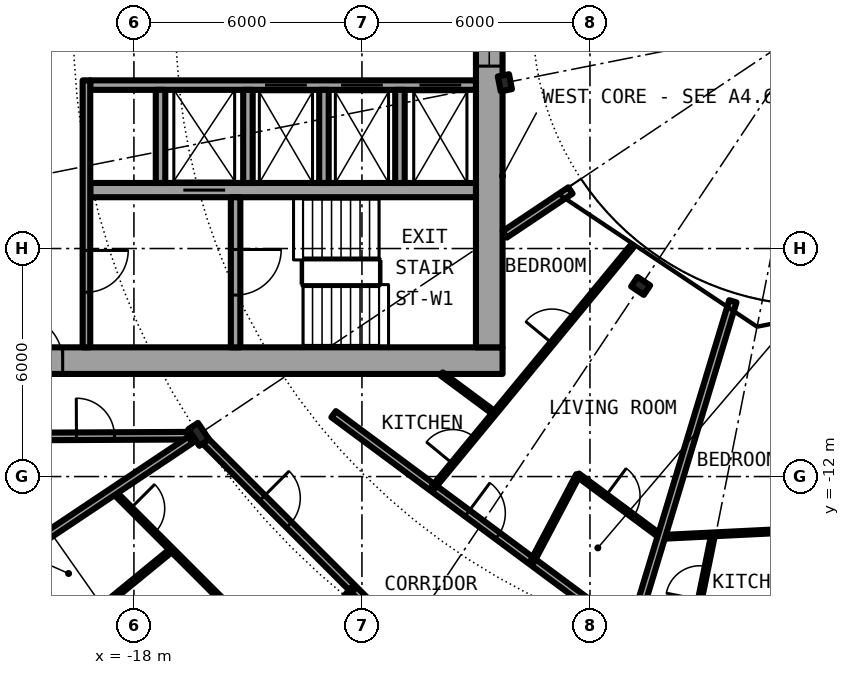
"""IFC4 building model, lengths in metres.
Left out: names, types, materials, properties, quantities, classifications, styles, units other than length and angle.
Written with IfcOpenShell. Run it as: python <this file> out.ifc"""

import sys

from ifc_helpers import new_model, si_unit, direction, frame, frame_2d, origin, origin_2d, place, context, subcontext, project, spatial, rectangle, i_section, extrude, element, fill, save


model = new_model("IFC4")
c1 = context("Model", 3, precision=1e-05, world=origin(), true_north=direction((0.0, 1.0)))
c2 = subcontext(c1, "Body", "Model", "MODEL_VIEW")
j1 = project(units=[si_unit("LENGTHUNIT", "METRE"), si_unit("PLANEANGLEUNIT", "RADIAN")], contexts=[c1])
p1 = place(None, origin())
s1 = spatial("IfcSite", under=j1, at=p1, CompositionType="ELEMENT")
p2 = place(p1, origin())
s2 = spatial("IfcBuilding", under=s1, at=p2, CompositionType="ELEMENT")
p3 = place(p2, frame((0.0, 0.0, 63.6)))
s3 = spatial("IfcBuildingStorey", under=s2, at=p3, CompositionType="ELEMENT", Elevation=63.6)
p4 = place(p3, frame((-16.297, -10.889, 0.0), z_axis=(0.0, 0.0, 1.0), x_axis=(-0.831469612303, -0.55557023302, 0.0)))
e1 = element("IfcColumn", 1, at=p4, inside=s3, PredefinedType="COLUMN", context=c2, shape_type="SweptSolid", body=[
    extrude(i_section(OverallWidth=0.306, OverallDepth=0.524, WebThickness=0.021, FlangeThickness=0.04, FilletRadius=0.027, at=origin_2d()), origin(), (0.0, 0.0, 1.0), 3.05),
])
for number, where, z_axis, x_axis in (
    (2, (-8.239, -1.639, 0.0), (0.0, 0.0, 1.0), (-0.981, -0.195, 0.0)),
    (3, (-4.667, -6.984, 0.0), (0.0, 0.0, 1.0), (-0.556, -0.831, 0.0)),
):
    element("IfcColumn", number, at=place(p3, frame(where, z_axis=z_axis, x_axis=x_axis)), inside=s3, PredefinedType="COLUMN", context=c2, shape_type="SweptSolid", body=[
        extrude(i_section(OverallWidth=0.3, OverallDepth=0.4, WebThickness=0.013, FlangeThickness=0.024, FilletRadius=0.027, at=origin_2d()), origin(), (0.0, 0.0, 1.0), 3.05),
    ])
p5 = place(p3, frame((-22.699, -15.167, 0.0), z_axis=(0.0, 0.0, 1.0), x_axis=(0.634382322723, -0.773019449054, 0.0)))
e4 = element("IfcWall", 4, at=p5, inside=s3, PredefinedType="SOLIDWALL", context=c2, shape_type="SweptSolid", body=[
    extrude(rectangle(XDim=5.352, YDim=0.25, at=frame_2d((2.676, 0.0))), origin(), (0.0, 0.0, 1.0), 2.7),
])
p6 = place(p5, frame((0.841, 0.0, 0.0)))
e5 = element("IfcOpeningElement", 5, at=p6, cuts=e4, PredefinedType="OPENING", context=c2, shape_type="SweptSolid", body=[
    extrude(rectangle(XDim=1.0, YDim=2.2, at=frame_2d((0.5, 1.1))), frame((0.0, 0.135, 0.0), z_axis=(0.0, -1.0, 0.0), x_axis=(1.0, 0.0, 0.0)), (0.0, 0.0, 1.0), 0.27),
])
p7 = place(p5, frame((3.111, 0.0, 0.3)))
e6 = element("IfcOpeningElement", 6, at=p7, cuts=e4, PredefinedType="OPENING", context=c2, shape_type="SweptSolid", body=[
    extrude(rectangle(XDim=1.8, YDim=2.1, at=frame_2d((0.9, 1.05))), frame((0.0, 0.135, 0.0), z_axis=(0.0, -1.0, 0.0), x_axis=(1.0, 0.0, 0.0)), (0.0, 0.0, 1.0), 0.27),
])
p8 = place(p3, frame((-22.3, -8.95, 0.0), z_axis=(0.0, 0.0, 1.0), x_axis=(1.0, 0.0, 0.0)))
e7 = element("IfcWall", 7, at=p8, inside=s3, PredefinedType="SHEAR", context=c2, shape_type="SweptSolid", body=[
    extrude(rectangle(XDim=14.0, YDim=0.7, at=frame_2d((7.0, 0.0))), origin(), (0.0, 0.0, 1.0), 3.05),
])
p9 = place(p8, frame((1.225, 0.0, 0.0)))
e8 = element("IfcOpeningElement", 8, at=p9, cuts=e7, PredefinedType="OPENING", context=c2, shape_type="SweptSolid", body=[
    extrude(rectangle(XDim=1.2, YDim=2.3, at=frame_2d((0.6, 1.15))), frame((0.0, 0.36, 0.0), z_axis=(0.0, -1.0, 0.0), x_axis=(1.0, 0.0, 0.0)), (0.0, 0.0, 1.0), 0.72),
])
p10 = place(p3, frame((-8.65, 8.6, 0.0), z_axis=(0.0, 0.0, 1.0), x_axis=(0.0, -1.0, 0.0)))
e9 = element("IfcWall", 9, at=p10, inside=s3, PredefinedType="SHEAR", context=c2, shape_type="SweptSolid", body=[
    extrude(rectangle(XDim=17.2, YDim=0.7, at=frame_2d((8.6, 0.0))), origin(), (0.0, 0.0, 1.0), 3.05),
])
p11 = place(p10, frame((7.4, 0.0, 0.1)))
e10 = element("IfcOpeningElement", 10, at=p11, cuts=e9, PredefinedType="OPENING", context=c2, shape_type="SweptSolid", body=[
    extrude(rectangle(XDim=2.4, YDim=2.2, at=frame_2d((1.2, 1.1))), frame((0.0, 0.36, 0.0), z_axis=(0.0, -1.0, 0.0), x_axis=(1.0, 0.0, 0.0)), (0.0, 0.0, 1.0), 0.72),
])
p12 = place(p3, frame((-9.0, -1.7, 0.0), z_axis=(0.0, 0.0, 1.0), x_axis=(-1.0, 0.0, 0.0)))
e11 = element("IfcWall", 11, at=p12, inside=s3, PredefinedType="SHEAR", context=c2, shape_type="SweptSolid", body=[
    extrude(rectangle(XDim=10.15, YDim=0.25, at=frame_2d((5.075, 0.0))), origin(), (0.0, 0.0, 1.0), 3.05),
])
p13 = place(p12, frame((0.387, 0.0, 0.0)))
e12 = element("IfcOpeningElement", 12, at=p13, cuts=e11, PredefinedType="OPENING", context=c2, shape_type="SweptSolid", body=[
    extrude(rectangle(XDim=1.1, YDim=2.3, at=frame_2d((0.55, 1.15))), frame((0.0, 0.135, 0.0), z_axis=(0.0, -1.0, 0.0), x_axis=(1.0, 0.0, 0.0)), (0.0, 0.0, 1.0), 0.27),
])
p14 = place(p12, frame((2.45, 0.0, 0.0)))
e13 = element("IfcOpeningElement", 13, at=p14, cuts=e11, PredefinedType="OPENING", context=c2, shape_type="SweptSolid", body=[
    extrude(rectangle(XDim=1.1, YDim=2.3, at=frame_2d((0.55, 1.15))), frame((0.0, 0.135, 0.0), z_axis=(0.0, -1.0, 0.0), x_axis=(1.0, 0.0, 0.0)), (0.0, 0.0, 1.0), 0.27),
])
p15 = place(p12, frame((4.45, 0.0, 0.0)))
e14 = element("IfcOpeningElement", 14, at=p15, cuts=e11, PredefinedType="OPENING", context=c2, shape_type="SweptSolid", body=[
    extrude(rectangle(XDim=1.1, YDim=2.3, at=frame_2d((0.55, 1.15))), frame((0.0, 0.135, 0.0), z_axis=(0.0, -1.0, 0.0), x_axis=(1.0, 0.0, 0.0)), (0.0, 0.0, 1.0), 0.27),
])
p16 = place(p3, frame((-9.0, -4.462, 0.0), z_axis=(0.0, 0.0, 1.0), x_axis=(-1.0, 0.0, 0.0)))
e15 = element("IfcWall", 15, at=p16, inside=s3, PredefinedType="SHEAR", context=c2, shape_type="SweptSolid", body=[
    extrude(rectangle(XDim=10.15, YDim=0.375, at=frame_2d((5.075, 0.0))), origin(), (0.0, 0.0, 1.0), 3.05),
])
p17 = place(p16, frame((6.6, 0.0, 0.0)))
e16 = element("IfcOpeningElement", 16, at=p17, cuts=e15, PredefinedType="OPENING", context=c2, shape_type="SweptSolid", body=[
    extrude(rectangle(XDim=1.1, YDim=2.3, at=frame_2d((0.55, 1.15))), frame((0.0, 0.198, 0.0), z_axis=(0.0, -1.0, 0.0), x_axis=(1.0, 0.0, 0.0)), (0.0, 0.0, 1.0), 0.395),
])
p18 = place(p3, frame((-15.325, -4.65, 0.0), z_axis=(0.0, 0.0, 1.0), x_axis=(0.0, -1.0, 0.0)))
e17 = element("IfcWall", 17, at=p18, inside=s3, PredefinedType="SHEAR", context=c2, shape_type="SweptSolid", body=[
    extrude(rectangle(XDim=3.95, YDim=0.25, at=frame_2d((1.975, 0.0))), origin(), (0.0, 0.0, 1.0), 3.05),
])
p19 = place(p18, frame((1.375, 0.0, 0.0)))
e18 = element("IfcOpeningElement", 18, at=p19, cuts=e17, PredefinedType="OPENING", context=c2, shape_type="SweptSolid", body=[
    extrude(rectangle(XDim=1.2, YDim=2.3, at=frame_2d((0.6, 1.15))), frame((0.0, 0.135, 0.0), z_axis=(0.0, -1.0, 0.0), x_axis=(1.0, 0.0, 0.0)), (0.0, 0.0, 1.0), 0.27),
])
for number, where, z_axis, x_axis in (
    (19, (-15.0, -1.825, 0.0), (0.0, 0.0, 1.0), (0.0, -1.0, 0.0)),
    (20, (-17.3, -1.825, 0.0), (0.0, 0.0, 1.0), (0.0, -1.0, 0.0)),
):
    element("IfcWall", number, at=place(p3, frame(where, z_axis=z_axis, x_axis=x_axis)), inside=s3, PredefinedType="SOLIDWALL", context=c2, shape_type="SweptSolid", body=[
        extrude(rectangle(XDim=2.45, YDim=0.25, at=frame_2d((1.225, 0.0))), origin(), (0.0, 0.0, 1.0), 2.7),
    ])
p20 = place(p3, frame((-19.25, -1.575, 0.0), z_axis=(0.0, 0.0, 1.0), x_axis=(0.0, -1.0, 0.0)))
e21 = element("IfcWall", 21, at=p20, inside=s3, PredefinedType="SOLIDWALL", context=c2, shape_type="SweptSolid", body=[
    extrude(rectangle(XDim=7.025, YDim=0.2, at=frame_2d((3.513, 0.0))), origin(), (0.0, 0.0, 1.0), 2.7),
])
p21 = place(p20, frame((4.475, 0.0, 0.0)))
e22 = element("IfcOpeningElement", 22, at=p21, cuts=e21, PredefinedType="OPENING", context=c2, shape_type="SweptSolid", body=[
    extrude(rectangle(XDim=1.1, YDim=2.3, at=frame_2d((0.55, 1.15))), frame((0.0, 0.11, 0.0), z_axis=(0.0, -1.0, 0.0), x_axis=(1.0, 0.0, 0.0)), (0.0, 0.0, 1.0), 0.22),
])
for number, where, z_axis, x_axis in (
    (23, (-11.0, -1.825, 0.0), (0.0, 0.0, 1.0), (0.0, -1.0, 0.0)),
    (24, (-13.0, -1.825, 0.0), (0.0, 0.0, 1.0), (0.0, -1.0, 0.0)),
):
    element("IfcWall", number, at=place(p3, frame(where, z_axis=z_axis, x_axis=x_axis)), inside=s3, PredefinedType="SOLIDWALL", context=c2, shape_type="SweptSolid", body=[
        extrude(rectangle(XDim=2.45, YDim=0.25, at=frame_2d((1.225, 0.0))), origin(), (0.0, 0.0, 1.0), 2.7),
    ])
p22 = place(p3, frame((-18.545, -12.386, 0.0), z_axis=(0.0, 0.0, 1.0), x_axis=(0.707106781187, -0.707106781187, 0.0)))
e25 = element("IfcWall", 25, at=p22, inside=s3, PredefinedType="PARTITIONING", context=c2, shape_type="SweptSolid", body=[
    extrude(rectangle(XDim=4.351, YDim=0.1, at=frame_2d((2.176, 0.0))), origin(), (0.0, 0.0, 1.0), 2.7),
])
p23 = place(p22, frame((0.644, 0.0, 0.0)))
e26 = element("IfcOpeningElement", 26, at=p23, cuts=e25, PredefinedType="OPENING", context=c2, shape_type="SweptSolid", body=[
    extrude(rectangle(XDim=0.9, YDim=2.3, at=frame_2d((0.45, 1.15))), frame((0.0, 0.06, 0.0), z_axis=(0.0, -1.0, 0.0), x_axis=(1.0, 0.0, 0.0)), (0.0, 0.0, 1.0), 0.12),
])
p24 = place(p3, frame((-16.186, -11.0, 0.0), z_axis=(0.0, 0.0, 1.0), x_axis=(0.707106781187, -0.707106781187, 0.0)))
e27 = element("IfcWall", 27, at=p24, inside=s3, PredefinedType="PARTITIONING", context=c2, shape_type="SweptSolid", body=[
    extrude(rectangle(XDim=7.334, YDim=0.2, at=frame_2d((3.667, 0.0))), origin(), (0.0, 0.0, 1.0), 2.38),
])
p25 = place(p24, frame((2.211, 0.0, 0.0)))
e28 = element("IfcOpeningElement", 28, at=p25, cuts=e27, PredefinedType="OPENING", context=c2, shape_type="SweptSolid", body=[
    extrude(rectangle(XDim=1.0, YDim=2.3, at=frame_2d((0.5, 1.15))), frame((0.0, 0.11, 0.0), z_axis=(0.0, -1.0, 0.0), x_axis=(1.0, 0.0, 0.0)), (0.0, 0.0, 1.0), 0.22),
])
p26 = place(p3, frame((-12.745, -10.358, 0.0), z_axis=(0.0, 0.0, 1.0), x_axis=(0.803191461888, -0.595720971219, 0.0)))
e29 = element("IfcWall", 29, at=p26, inside=s3, PredefinedType="PARTITIONING", context=c2, shape_type="SweptSolid", body=[
    extrude(rectangle(XDim=9.76, YDim=0.2, at=frame_2d((4.88, 0.0))), origin(), (0.0, 0.0, 1.0), 2.7),
])
p27 = place(p26, frame((4.38, 0.0, 0.0)))
e30 = element("IfcOpeningElement", 30, at=p27, cuts=e29, PredefinedType="OPENING", context=c2, shape_type="SweptSolid", body=[
    extrude(rectangle(XDim=1.0, YDim=2.3, at=frame_2d((0.5, 1.15))), frame((0.0, 0.11, 0.0), z_axis=(0.0, -1.0, 0.0), x_axis=(1.0, 0.0, 0.0)), (0.0, 0.0, 1.0), 0.22),
])
p28 = place(p3, frame((-9.904, -9.3, 0.0), z_axis=(0.0, 0.0, 1.0), x_axis=(0.803135014325, -0.595797070121, 0.0)))
e31 = element("IfcWall", 31, at=p28, inside=s3, PredefinedType="PARTITIONING", context=c2, shape_type="SweptSolid", body=[
    extrude(rectangle(XDim=1.732, YDim=0.1, at=frame_2d((0.866, 0.0))), origin(), (0.0, 0.0, 1.0), 2.7),
])
p29 = place(p3, frame((-6.319, -11.96, 0.0), z_axis=(0.0, 0.0, 1.0), x_axis=(0.803128348509, -0.595806055542, 0.0)))
e32 = element("IfcWall", 32, at=p29, inside=s3, PredefinedType="PARTITIONING", context=c2, shape_type="SweptSolid", body=[
    extrude(rectangle(XDim=2.734, YDim=0.1, at=frame_2d((1.367, 0.0))), origin(), (0.0, 0.0, 1.0), 2.7),
])
p30 = place(p29, frame((0.918, 0.0, 0.0)))
e33 = element("IfcOpeningElement", 33, at=p30, cuts=e32, PredefinedType="OPENING", context=c2, shape_type="SweptSolid", body=[
    extrude(rectangle(XDim=0.9, YDim=2.3, at=frame_2d((0.45, 1.15))), frame((0.0, 0.06, 0.0), z_axis=(0.0, -1.0, 0.0), x_axis=(1.0, 0.0, 0.0)), (0.0, 0.0, 1.0), 0.12),
])
p31 = place(p3, frame((-4.132, -13.589, 0.0), z_axis=(0.0, 0.0, 1.0), x_axis=(0.998789681748, 0.049185075323, 0.0)))
e34 = element("IfcWall", 34, at=p31, inside=s3, PredefinedType="PARTITIONING", context=c2, shape_type="SweptSolid", body=[
    extrude(rectangle(XDim=4.11, YDim=0.1, at=frame_2d((2.055, 0.0))), origin(), (0.0, 0.0, 1.0), 2.7),
])
p32 = place(p3, frame((-21.675, -10.95, 0.0), z_axis=(0.0, 0.0, 1.0), x_axis=(0.999988019025, 0.004895079807, 0.0)))
e35 = element("IfcWall", 35, at=p32, inside=s3, PredefinedType="PARTITIONING", context=c2, shape_type="SweptSolid", body=[
    extrude(rectangle(XDim=5.087, YDim=0.2, at=frame_2d((2.543, 0.0))), origin(), (0.0, 0.0, 1.0), 2.7),
])
p33 = place(p32, frame((2.163, 0.0, 0.0)))
e36 = element("IfcOpeningElement", 36, at=p33, cuts=e35, PredefinedType="OPENING", context=c2, shape_type="SweptSolid", body=[
    extrude(rectangle(XDim=1.0, YDim=2.3, at=frame_2d((0.5, 1.15))), frame((0.0, 0.11, 0.0), z_axis=(0.0, -1.0, 0.0), x_axis=(1.0, 0.0, 0.0)), (0.0, 0.0, 1.0), 0.22),
])
p34 = place(p3, frame((-6.513, -4.472, 0.0), z_axis=(0.0, 0.0, 1.0), x_axis=(-0.831382204863, -0.555701025225, 0.0)))
e37 = element("IfcWall", 37, at=p34, inside=s3, PredefinedType="PARTITIONING", context=c2, shape_type="SweptSolid", body=[
    extrude(rectangle(XDim=2.082, YDim=0.2, at=frame_2d((1.041, 0.0))), origin(), (0.0, 0.0, 1.0), 2.7),
])
p35 = place(p3, frame((-22.595, -15.097, 0.0), z_axis=(0.0, 0.0, 1.0), x_axis=(0.831505405283, 0.555516661303, 0.0)))
e38 = element("IfcWall", 38, at=p35, inside=s3, PredefinedType="PARTITIONING", context=c2, shape_type="SweptSolid", body=[
    extrude(rectangle(XDim=7.312, YDim=0.2, at=frame_2d((3.656, 0.0))), origin(), (0.0, 0.0, 1.0), 2.7),
])
p36 = place(p3, frame((-21.023, -17.22, 0.0), z_axis=(0.0, 0.0, 1.0), x_axis=(0.773517471898, 0.633774976367, 0.0)))
e39 = element("IfcWall", 39, at=p36, inside=s3, PredefinedType="PARTITIONING", context=c2, shape_type="SweptSolid", body=[
    extrude(rectangle(XDim=5.196, YDim=0.1, at=frame_2d((2.598, 0.0))), origin(), (0.0, 0.0, 1.0), 2.7),
])
p37 = place(p3, frame((-13.927, -17.004, 0.0), z_axis=(0.0, 0.0, 1.0), x_axis=(0.633582447834, 0.77367517848, 0.0)))
e40 = element("IfcWall", 40, at=p37, inside=s3, PredefinedType="PARTITIONING", context=c2, shape_type="SweptSolid", body=[
    extrude(rectangle(XDim=2.661, YDim=0.1, at=frame_2d((1.331, 0.0))), origin(), (0.0, 0.0, 1.0), 2.7),
])
p38 = place(p37, frame((0.881, 0.0, 0.0)))
e41 = element("IfcOpeningElement", 41, at=p38, cuts=e40, PredefinedType="OPENING", context=c2, shape_type="SweptSolid", body=[
    extrude(rectangle(XDim=0.9, YDim=2.3, at=frame_2d((0.45, 1.15))), frame((0.0, 0.06, 0.0), z_axis=(0.0, -1.0, 0.0), x_axis=(1.0, 0.0, 0.0)), (0.0, 0.0, 1.0), 0.12),
])
p39 = place(p3, frame((-10.132, -12.296, 0.0), z_axis=(0.0, 0.0, 1.0), x_axis=(0.636105207978, 0.771602335652, 0.0)))
e42 = element("IfcWall", 42, at=p39, inside=s3, PredefinedType="PARTITIONING", context=c2, shape_type="SweptSolid", body=[
    extrude(rectangle(XDim=8.213, YDim=0.1, at=frame_2d((4.106, 0.0))), origin(), (0.0, 0.0, 1.0), 2.7),
])
p40 = place(p39, frame((0.821, 0.0, 0.0)))
e43 = element("IfcOpeningElement", 43, at=p40, cuts=e42, PredefinedType="OPENING", context=c2, shape_type="SweptSolid", body=[
    extrude(rectangle(XDim=0.9, YDim=2.3, at=frame_2d((0.45, 1.15))), frame((0.0, 0.06, 0.0), z_axis=(0.0, -1.0, 0.0), x_axis=(1.0, 0.0, 0.0)), (0.0, 0.0, 1.0), 0.12),
])
p41 = place(p39, frame((4.929, 0.0, 0.0)))
e44 = element("IfcOpeningElement", 44, at=p41, cuts=e42, PredefinedType="OPENING", context=c2, shape_type="SweptSolid", body=[
    extrude(rectangle(XDim=0.9, YDim=2.3, at=frame_2d((0.45, 1.15))), frame((0.0, 0.06, 0.0), z_axis=(0.0, -1.0, 0.0), x_axis=(1.0, 0.0, 0.0)), (0.0, 0.0, 1.0), 0.12),
])
p42 = place(p3, frame((-7.517, -14.235, 0.0), z_axis=(0.0, 0.0, 1.0), x_axis=(0.467037016128, 0.884237765291, 0.0)))
e45 = element("IfcWall", 45, at=p42, inside=s3, PredefinedType="PARTITIONING", context=c2, shape_type="SweptSolid", body=[
    extrude(rectangle(XDim=2.572, YDim=0.1, at=frame_2d((1.286, 0.0))), origin(), (0.0, 0.0, 1.0), 2.7),
])
p43 = place(p3, frame((-4.906, -16.172, 0.0), z_axis=(0.0, 0.0, 1.0), x_axis=(0.290420725025, 0.956899055531, 0.0)))
e46 = element("IfcWall", 46, at=p43, inside=s3, PredefinedType="PARTITIONING", context=c2, shape_type="SweptSolid", body=[
    extrude(rectangle(XDim=9.18, YDim=0.2, at=frame_2d((4.59, 0.0))), origin(), (0.0, 0.0, 1.0), 2.7),
])
p44 = place(p3, frame((-3.281, -16.092, 0.0), z_axis=(0.0, 0.0, 1.0), x_axis=(0.199675621436, 0.979862054681, 0.0)))
e47 = element("IfcWall", 47, at=p44, inside=s3, PredefinedType="PARTITIONING", context=c2, shape_type="SweptSolid", body=[
    extrude(rectangle(XDim=2.624, YDim=0.1, at=frame_2d((1.312, 0.0))), origin(), (0.0, 0.0, 1.0), 2.7),
])
p45 = place(p44, frame((0.862, 0.0, 0.0)))
e48 = element("IfcOpeningElement", 48, at=p45, cuts=e47, PredefinedType="OPENING", context=c2, shape_type="SweptSolid", body=[
    extrude(rectangle(XDim=0.9, YDim=2.3, at=frame_2d((0.45, 1.15))), frame((0.0, 0.06, 0.0), z_axis=(0.0, -1.0, 0.0), x_axis=(1.0, 0.0, 0.0)), (0.0, 0.0, 1.0), 0.12),
])
p46 = place(p13, origin())
e49 = element("IfcDoor", 49, at=p46, inside=s3, OperationType="DOUBLE_DOOR_SLIDING", PredefinedType="DOOR", context=c2, shape_type="SweptSolid", body=[
    extrude(rectangle(XDim=1.1, YDim=2.3, at=frame_2d((0.55, 1.15))), frame((0.0, 0.025, 0.0), z_axis=(0.0, -1.0, 0.0), x_axis=(1.0, 0.0, 0.0)), (0.0, 0.0, 1.0), 0.05),
])
fill(e12, e49)
p47 = place(p14, origin())
e50 = element("IfcDoor", 50, at=p47, inside=s3, OperationType="DOUBLE_DOOR_SLIDING", PredefinedType="DOOR", context=c2, shape_type="SweptSolid", body=[
    extrude(rectangle(XDim=1.1, YDim=2.3, at=frame_2d((0.55, 1.15))), frame((0.0, 0.025, 0.0), z_axis=(0.0, -1.0, 0.0), x_axis=(1.0, 0.0, 0.0)), (0.0, 0.0, 1.0), 0.05),
])
fill(e13, e50)
p48 = place(p15, origin())
e51 = element("IfcDoor", 51, at=p48, inside=s3, OperationType="DOUBLE_DOOR_SLIDING", PredefinedType="DOOR", context=c2, shape_type="SweptSolid", body=[
    extrude(rectangle(XDim=1.1, YDim=2.3, at=frame_2d((0.55, 1.15))), frame((0.0, 0.025, 0.0), z_axis=(0.0, -1.0, 0.0), x_axis=(1.0, 0.0, 0.0)), (0.0, 0.0, 1.0), 0.05),
])
fill(e14, e51)
p49 = place(p17, origin())
e52 = element("IfcDoor", 52, at=p49, inside=s3, OperationType="DOUBLE_DOOR_SLIDING", PredefinedType="DOOR", context=c2, shape_type="SweptSolid", body=[
    extrude(rectangle(XDim=1.1, YDim=2.3, at=frame_2d((0.55, 1.15))), frame((0.0, 0.025, 0.0), z_axis=(0.0, -1.0, 0.0), x_axis=(1.0, 0.0, 0.0)), (0.0, 0.0, 1.0), 0.05),
])
fill(e16, e52)
p50 = place(p19, origin())
e53 = element("IfcDoor", 53, at=p50, inside=s3, OperationType="SINGLE_SWING_LEFT", PredefinedType="DOOR", context=c2, shape_type="SweptSolid", body=[
    extrude(rectangle(XDim=1.2, YDim=2.3, at=frame_2d((0.6, 1.15))), frame((0.0, 0.025, 0.0), z_axis=(0.0, -1.0, 0.0), x_axis=(1.0, 0.0, 0.0)), (0.0, 0.0, 1.0), 0.05),
])
fill(e18, e53)
p51 = place(p21, origin())
e54 = element("IfcDoor", 54, at=p51, inside=s3, OperationType="SINGLE_SWING_LEFT", PredefinedType="DOOR", context=c2, shape_type="SweptSolid", body=[
    extrude(rectangle(XDim=1.1, YDim=2.3, at=frame_2d((0.55, 1.15))), frame((0.0, 0.025, 0.0), z_axis=(0.0, -1.0, 0.0), x_axis=(1.0, 0.0, 0.0)), (0.0, 0.0, 1.0), 0.05),
])
fill(e22, e54)
p52 = place(p9, origin())
e55 = element("IfcDoor", 55, at=p52, inside=s3, OperationType="SINGLE_SWING_RIGHT", PredefinedType="DOOR", context=c2, shape_type="SweptSolid", body=[
    extrude(rectangle(XDim=1.2, YDim=2.3, at=frame_2d((0.6, 1.15))), frame((0.0, 0.025, 0.0), z_axis=(0.0, -1.0, 0.0), x_axis=(1.0, 0.0, 0.0)), (0.0, 0.0, 1.0), 0.05),
])
fill(e8, e55)
p53 = place(p11, origin())
e56 = element("IfcWindow", 56, at=p53, inside=s3, PartitioningType="SINGLE_PANEL", PredefinedType="WINDOW", context=c2, shape_type="SweptSolid", body=[
    extrude(rectangle(XDim=2.4, YDim=2.2, at=frame_2d((1.2, 1.1))), frame((0.0, 0.03, 0.0), z_axis=(0.0, -1.0, 0.0), x_axis=(1.0, 0.0, 0.0)), (0.0, 0.0, 1.0), 0.06),
])
fill(e10, e56)
p54 = place(p25, origin())
e57 = element("IfcDoor", 57, at=p54, inside=s3, OperationType="SINGLE_SWING_LEFT", PredefinedType="DOOR", context=c2, shape_type="SweptSolid", body=[
    extrude(rectangle(XDim=1.0, YDim=2.3, at=frame_2d((0.5, 1.15))), frame((0.0, 0.025, 0.0), z_axis=(0.0, -1.0, 0.0), x_axis=(1.0, 0.0, 0.0)), (0.0, 0.0, 1.0), 0.05),
])
fill(e28, e57)
p55 = place(p23, origin())
e58 = element("IfcDoor", 58, at=p55, inside=s3, OperationType="SINGLE_SWING_LEFT", PredefinedType="DOOR", context=c2, shape_type="SweptSolid", body=[
    extrude(rectangle(XDim=0.9, YDim=2.3, at=frame_2d((0.45, 1.15))), frame((0.0, 0.025, 0.0), z_axis=(0.0, -1.0, 0.0), x_axis=(1.0, 0.0, 0.0)), (0.0, 0.0, 1.0), 0.05),
])
fill(e26, e58)
p56 = place(p27, origin())
e59 = element("IfcDoor", 59, at=p56, inside=s3, OperationType="SINGLE_SWING_RIGHT", PredefinedType="DOOR", context=c2, shape_type="SweptSolid", body=[
    extrude(rectangle(XDim=1.0, YDim=2.3, at=frame_2d((0.5, 1.15))), frame((0.0, 0.025, 0.0), z_axis=(0.0, -1.0, 0.0), x_axis=(1.0, 0.0, 0.0)), (0.0, 0.0, 1.0), 0.05),
])
fill(e30, e59)
p57 = place(p30, origin())
e60 = element("IfcDoor", 60, at=p57, inside=s3, OperationType="SINGLE_SWING_RIGHT", PredefinedType="DOOR", context=c2, shape_type="SweptSolid", body=[
    extrude(rectangle(XDim=0.9, YDim=2.3, at=frame_2d((0.45, 1.15))), frame((0.0, 0.025, 0.0), z_axis=(0.0, -1.0, 0.0), x_axis=(1.0, 0.0, 0.0)), (0.0, 0.0, 1.0), 0.05),
])
fill(e33, e60)
p58 = place(p40, origin())
e61 = element("IfcDoor", 61, at=p58, inside=s3, OperationType="SINGLE_SWING_LEFT", PredefinedType="DOOR", context=c2, shape_type="SweptSolid", body=[
    extrude(rectangle(XDim=0.9, YDim=2.3, at=frame_2d((0.45, 1.15))), frame((0.0, 0.025, 0.0), z_axis=(0.0, -1.0, 0.0), x_axis=(1.0, 0.0, 0.0)), (0.0, 0.0, 1.0), 0.05),
])
fill(e43, e61)
p59 = place(p41, origin())
e62 = element("IfcDoor", 62, at=p59, inside=s3, OperationType="SINGLE_SWING_RIGHT", PredefinedType="DOOR", context=c2, shape_type="SweptSolid", body=[
    extrude(rectangle(XDim=0.9, YDim=2.3, at=frame_2d((0.45, 1.15))), frame((0.0, 0.025, 0.0), z_axis=(0.0, -1.0, 0.0), x_axis=(1.0, 0.0, 0.0)), (0.0, 0.0, 1.0), 0.05),
])
fill(e44, e62)
p60 = place(p45, origin())
e63 = element("IfcDoor", 63, at=p60, inside=s3, OperationType="SINGLE_SWING_LEFT", PredefinedType="DOOR", context=c2, shape_type="SweptSolid", body=[
    extrude(rectangle(XDim=0.9, YDim=2.3, at=frame_2d((0.45, 1.15))), frame((0.0, 0.025, 0.0), z_axis=(0.0, -1.0, 0.0), x_axis=(1.0, 0.0, 0.0)), (0.0, 0.0, 1.0), 0.05),
])
fill(e48, e63)
p61 = place(p33, origin())
e64 = element("IfcDoor", 64, at=p61, inside=s3, OperationType="SINGLE_SWING_RIGHT", PredefinedType="DOOR", context=c2, shape_type="SweptSolid", body=[
    extrude(rectangle(XDim=1.0, YDim=2.3, at=frame_2d((0.5, 1.15))), frame((0.0, 0.025, 0.0), z_axis=(0.0, -1.0, 0.0), x_axis=(1.0, 0.0, 0.0)), (0.0, 0.0, 1.0), 0.05),
])
fill(e36, e64)
save(model, sys.argv[1])
